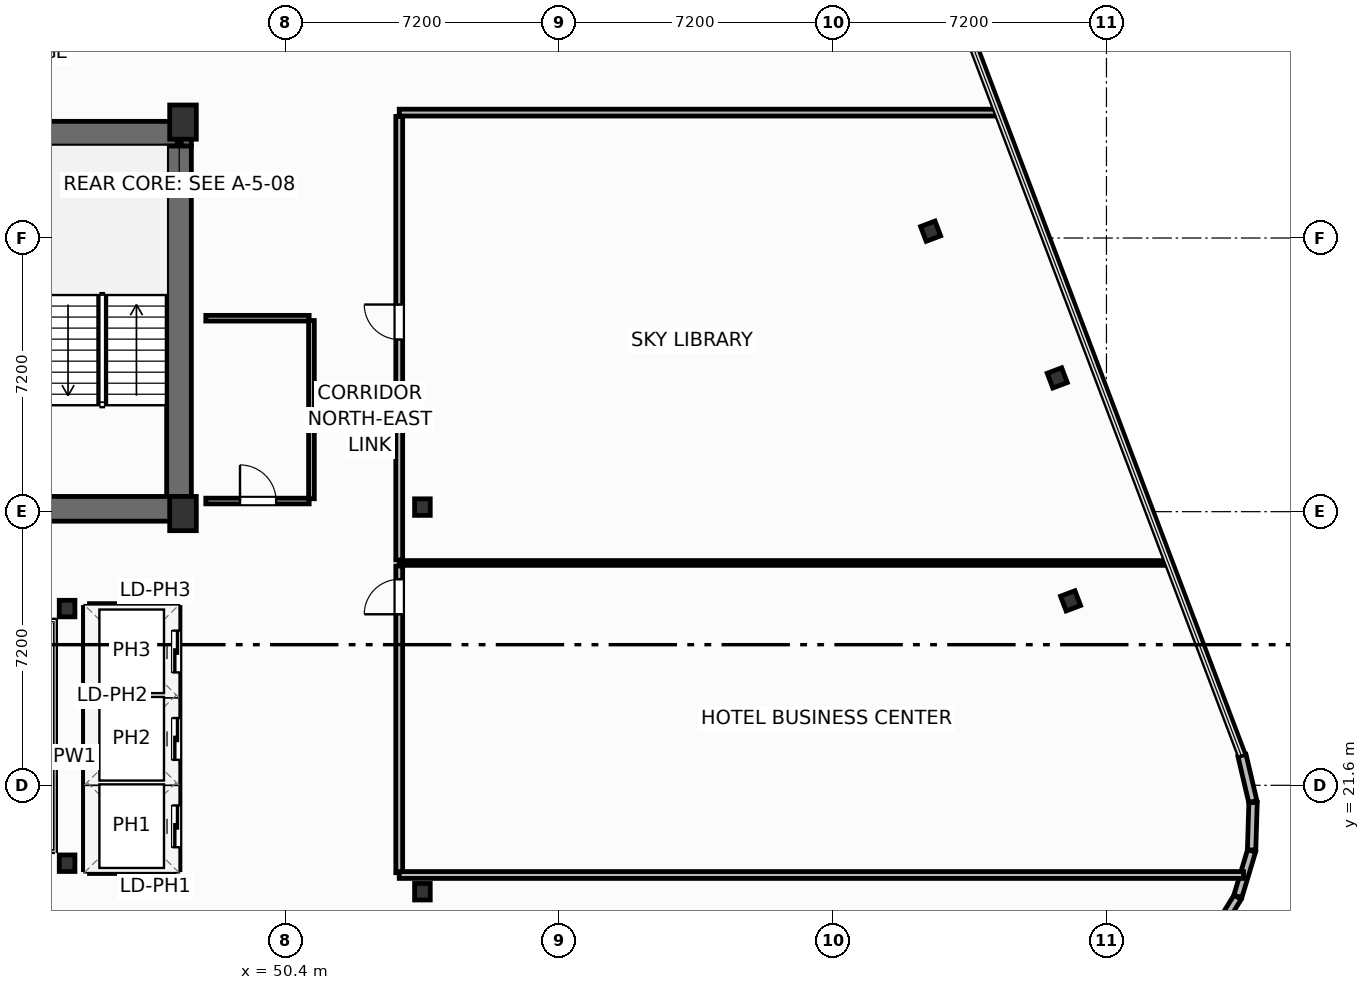
"""IFC4 building model, lengths in metres.
Left out: names, types, materials, properties, quantities, classifications, styles, units other than length and angle.
Written with IfcOpenShell. Run it as: python <this file> out.ifc"""

import sys

from ifc_helpers import new_model, si_unit, direction, frame, frame_2d, origin, origin_2d, place, context, subcontext, project, spatial, rectangle, i_section, extrude, element, fill, save


model = new_model("IFC4")
c1 = context("Model", 3, precision=1e-05, world=origin(), true_north=direction((0.0, 1.0)))
c2 = subcontext(c1, "Body", "Model", "MODEL_VIEW")
j1 = project(units=[si_unit("LENGTHUNIT", "METRE"), si_unit("PLANEANGLEUNIT", "RADIAN")], contexts=[c1])
p1 = place(None, origin())
s1 = spatial("IfcSite", under=j1, at=p1, CompositionType="ELEMENT")
p2 = place(p1, origin())
s2 = spatial("IfcBuilding", under=s1, at=p2, CompositionType="ELEMENT")
p3 = place(p2, frame((0.0, 0.0, 246.0)))
s3 = spatial("IfcBuildingStorey", under=s2, at=p3, CompositionType="ELEMENT", Elevation=246.0)
for number, where, z_axis, x_axis in (
    (1, (47.7, 28.75, 0.0), (0.0, 0.0, 1.0), (1.0, 0.0, 0.0)),
    (2, (47.7, 39.05, 0.0), (0.0, 0.0, 1.0), (1.0, 0.0, 0.0)),
):
    element("IfcColumn", number, at=place(p3, frame(where, z_axis=z_axis, x_axis=x_axis)), inside=s3, PredefinedType="COLUMN", context=c2, shape_type="SweptSolid", body=[
        extrude(rectangle(XDim=0.7, YDim=0.9, at=origin_2d()), origin(), (0.0, 0.0, 1.0), 3.7),
    ])
for number, where, z_axis, x_axis in (
    (3, (44.65, 19.55, 0.0), (0.0, 0.0, 1.0), (1.0, 0.0, 0.0)),
    (4, (44.65, 26.25, 0.0), (0.0, 0.0, 1.0), (1.0, 0.0, 0.0)),
    (5, (54.0, 18.8, 0.0), (0.0, 0.0, 1.0), (1.0, 0.0, 0.0)),
    (6, (54.0, 28.92, 0.0), (0.0, 0.0, 1.0), (1.0, 0.0, 0.0)),
):
    element("IfcColumn", number, at=place(p3, frame(where, z_axis=z_axis, x_axis=x_axis)), inside=s3, PredefinedType="COLUMN", context=c2, shape_type="SweptSolid", body=[
        extrude(i_section(OverallWidth=0.412, OverallDepth=0.435, WebThickness=0.036, FlangeThickness=0.057, FilletRadius=0.025, at=origin_2d()), origin(), (0.0, 0.0, 1.0), 3.7),
    ])
p4 = place(p3, frame((30.48, 38.745, 0.0), z_axis=(0.0, 0.0, 1.0), x_axis=(1.0, 0.0, 0.0)))
e7 = element("IfcWall", 7, at=p4, inside=s3, PredefinedType="SHEAR", context=c2, shape_type="SweptSolid", body=[
    extrude(rectangle(XDim=17.44, YDim=0.65, at=frame_2d((8.72, 0.0))), origin(), (0.0, 0.0, 1.0), 3.45),
])
p5 = place(p3, frame((47.595, 29.2, 0.0), z_axis=(0.0, 0.0, 1.0), x_axis=(0.0, 1.0, 0.0)))
e8 = element("IfcWall", 8, at=p5, inside=s3, PredefinedType="SHEAR", context=c2, shape_type="SweptSolid", body=[
    extrude(rectangle(XDim=9.22, YDim=0.65, at=frame_2d((4.61, 0.0))), origin(), (0.0, 0.0, 1.0), 3.45),
])
p6 = place(p3, frame((43.6, 28.875, 0.0), z_axis=(0.0, 0.0, 1.0), x_axis=(1.0, 0.0, 0.0)))
e9 = element("IfcWall", 9, at=p6, inside=s3, PredefinedType="SHEAR", context=c2, shape_type="SweptSolid", body=[
    extrude(rectangle(XDim=4.32, YDim=0.65, at=frame_2d((2.16, 0.0))), origin(), (0.0, 0.0, 1.0), 3.45),
])
for number, where, z_axis, x_axis in (
    (10, (71.055, 26.453, 0.0), (0.0, 0.0, 1.0), (0.935, 0.354, 0.0)),
    (11, (70.706, 32.32, 0.0), (0.0, 0.0, 1.0), (0.935, 0.354, 0.0)),
    (12, (67.373, 36.18, 0.0), (0.0, 0.0, 1.0), (0.935, 0.354, 0.0)),
):
    element("IfcColumn", number, at=place(p3, frame(where, z_axis=z_axis, x_axis=x_axis)), inside=s3, PredefinedType="COLUMN", context=c2, shape_type="SweptSolid", body=[
        extrude(i_section(OverallWidth=0.406, OverallDepth=0.416, WebThickness=0.03, FlangeThickness=0.048, FilletRadius=0.025, at=origin_2d()), origin(), (0.0, 0.0, 1.0), 3.7),
    ])
for number, where, z_axis, x_axis in (
    (13, (74.794, 17.593, 0.0), (0.0, 0.0, 1.0), (0.527, 0.85, 0.0)),
    (14, (75.458, 18.679, 0.0), (0.0, 0.0, 1.0), (0.288, 0.958, 0.0)),
):
    element("IfcWall", number, at=place(p3, frame(where, z_axis=z_axis, x_axis=x_axis)), inside=s3, PredefinedType="SOLIDWALL", context=c2, shape_type="SweptSolid", body=[
        extrude(rectangle(XDim=1.249, YDim=0.22, at=frame_2d((0.624, 0.0))), origin(), (0.0, 0.0, 1.0), 2.73),
    ])
p7 = place(p3, frame((75.819, 19.899, 0.0), z_axis=(0.0, 0.0, 1.0), x_axis=(0.030898954628, 0.999522513305, 0.0)))
e15 = element("IfcWall", 15, at=p7, inside=s3, PredefinedType="SOLIDWALL", context=c2, shape_type="SweptSolid", body=[
    extrude(rectangle(XDim=1.248, YDim=0.22, at=frame_2d((0.624, 0.0))), origin(), (0.0, 0.0, 1.0), 2.73),
])
p8 = place(p3, frame((75.852, 21.172, 0.0), z_axis=(0.0, 0.0, 1.0), x_axis=(-0.228941257463, 0.973440239887, 0.0)))
e16 = element("IfcWall", 16, at=p8, inside=s3, PredefinedType="SOLIDWALL", context=c2, shape_type="SweptSolid", body=[
    extrude(rectangle(XDim=1.249, YDim=0.22, at=frame_2d((0.625, 0.0))), origin(), (0.0, 0.0, 1.0), 2.73),
])
p9 = place(p3, frame((53.39, 19.3, 0.0), z_axis=(0.0, 0.0, 1.0), x_axis=(0.0, 1.0, 0.0)))
e17 = element("IfcWall", 17, at=p9, inside=s3, PredefinedType="PARTITIONING", context=c2, shape_type="SweptSolid", body=[
    extrude(rectangle(XDim=8.07, YDim=0.18, at=frame_2d((4.035, 0.0))), origin(), (0.0, 0.0, 1.0), 3.45),
])
p10 = place(p9, frame((6.8, 0.0, 0.0)))
e18 = element("IfcOpeningElement", 18, at=p10, cuts=e17, PredefinedType="OPENING", context=c2, shape_type="SweptSolid", body=[
    extrude(rectangle(XDim=0.92, YDim=2.05, at=frame_2d((0.46, 1.025))), frame((0.0, 0.1, 0.0), z_axis=(0.0, -1.0, 0.0), x_axis=(1.0, 0.0, 0.0)), (0.0, 0.0, 1.0), 0.2),
])
p11 = place(p3, frame((53.39, 27.53, 0.0), z_axis=(0.0, 0.0, 1.0), x_axis=(0.0, 1.0, 0.0)))
e19 = element("IfcWall", 19, at=p11, inside=s3, PredefinedType="PARTITIONING", context=c2, shape_type="SweptSolid", body=[
    extrude(rectangle(XDim=11.67, YDim=0.18, at=frame_2d((5.835, 0.0))), origin(), (0.0, 0.0, 1.0), 3.45),
])
p12 = place(p11, frame((5.8, 0.0, 0.0)))
e20 = element("IfcOpeningElement", 20, at=p12, cuts=e19, PredefinedType="OPENING", context=c2, shape_type="SweptSolid", body=[
    extrude(rectangle(XDim=0.92, YDim=2.05, at=frame_2d((0.46, 1.025))), frame((0.0, 0.1, 0.0), z_axis=(0.0, -1.0, 0.0), x_axis=(1.0, 0.0, 0.0)), (0.0, 0.0, 1.0), 0.2),
])
p13 = place(p3, frame((53.39, 27.45, 0.0), z_axis=(0.0, 0.0, 1.0), x_axis=(1.0, 0.0, 0.0)))
e21 = element("IfcWall", 21, at=p13, inside=s3, PredefinedType="PARTITIONING", context=c2, shape_type="SweptSolid", body=[
    extrude(rectangle(XDim=20.199, YDim=0.125, at=frame_2d((10.1, 0.0))), origin(), (0.0, 0.0, 1.0), 2.739),
])
p14 = place(p3, frame((53.39, 19.24, 0.0), z_axis=(0.0, 0.0, 1.0), x_axis=(1.0, 0.0, 0.0)))
e22 = element("IfcWall", 22, at=p14, inside=s3, PredefinedType="PARTITIONING", context=c2, shape_type="SweptSolid", body=[
    extrude(rectangle(XDim=22.217, YDim=0.18, at=frame_2d((11.108, 0.0))), origin(), (0.0, 0.0, 1.0), 3.45),
])
p15 = place(p3, frame((53.39, 39.3, 0.0), z_axis=(0.0, 0.0, 1.0), x_axis=(1.0, 0.0, 0.0)))
e23 = element("IfcWall", 23, at=p15, inside=s3, PredefinedType="PARTITIONING", context=c2, shape_type="SweptSolid", body=[
    extrude(rectangle(XDim=15.713, YDim=0.18, at=frame_2d((7.856, 0.0))), origin(), (0.0, 0.0, 1.0), 3.45),
])
p16 = place(p3, frame((48.3, 29.08, 0.0), z_axis=(0.0, 0.0, 1.0), x_axis=(1.0, 0.0, 0.0)))
e24 = element("IfcWall", 24, at=p16, inside=s3, PredefinedType="PARTITIONING", context=c2, shape_type="SweptSolid", body=[
    extrude(rectangle(XDim=2.72, YDim=0.15, at=frame_2d((1.36, 0.0))), origin(), (0.0, 0.0, 1.0), 2.662),
])
p17 = place(p16, frame((0.9, 0.0, 0.0)))
e25 = element("IfcOpeningElement", 25, at=p17, cuts=e24, PredefinedType="OPENING", context=c2, shape_type="SweptSolid", body=[
    extrude(rectangle(XDim=0.95, YDim=2.05, at=frame_2d((0.475, 1.025))), frame((0.0, 0.085, 0.0), z_axis=(0.0, -1.0, 0.0), x_axis=(1.0, 0.0, 0.0)), (0.0, 0.0, 1.0), 0.17),
])
p18 = place(p3, frame((48.3, 33.89, 0.0), z_axis=(0.0, 0.0, 1.0), x_axis=(1.0, 0.0, 0.0)))
e26 = element("IfcWall", 26, at=p18, inside=s3, PredefinedType="PARTITIONING", context=c2, shape_type="SweptSolid", body=[
    extrude(rectangle(XDim=2.72, YDim=0.15, at=frame_2d((1.36, 0.0))), origin(), (0.0, 0.0, 1.0), 3.45),
])
p19 = place(p3, frame((51.08, 29.14, 0.0), z_axis=(0.0, 0.0, 1.0), x_axis=(0.0, 1.0, 0.0)))
e27 = element("IfcWall", 27, at=p19, inside=s3, PredefinedType="PARTITIONING", context=c2, shape_type="SweptSolid", body=[
    extrude(rectangle(XDim=4.69, YDim=0.15, at=frame_2d((2.345, 0.0))), origin(), (0.0, 0.0, 1.0), 3.45),
])
for number, where, z_axis, x_axis in (
    (28, (45.24, 21.675, 0.0), (0.0, 0.0, 1.0), (1.0, 0.0, 0.0)),
    (29, (45.24, 23.975, 0.0), (0.0, 0.0, 1.0), (1.0, 0.0, 0.0)),
):
    element("IfcWall", number, at=place(p3, frame(where, z_axis=z_axis, x_axis=x_axis)), inside=s3, PredefinedType="PARTITIONING", context=c2, shape_type="SweptSolid", body=[
        extrude(rectangle(XDim=2.22, YDim=0.2, at=frame_2d((1.11, 0.0))), origin(), (0.0, 0.0, 1.0), 3.45),
    ])
p20 = place(p3, frame((45.24, 19.38, 0.0), z_axis=(0.0, 0.0, 1.0), x_axis=(1.0, 0.0, 0.0)))
e30 = element("IfcWall", 30, at=p20, inside=s3, PredefinedType="PARTITIONING", context=c2, shape_type="SweptSolid", body=[
    extrude(rectangle(XDim=2.22, YDim=0.2, at=frame_2d((1.11, 0.0))), origin(), (0.0, 0.0, 1.0), 2.662),
])
p21 = place(p3, frame((45.24, 26.28, 0.0), z_axis=(0.0, 0.0, 1.0), x_axis=(1.0, 0.0, 0.0)))
e31 = element("IfcWall", 31, at=p21, inside=s3, PredefinedType="PARTITIONING", context=c2, shape_type="SweptSolid", body=[
    extrude(rectangle(XDim=2.22, YDim=0.2, at=frame_2d((1.11, 0.0))), origin(), (0.0, 0.0, 1.0), 3.45),
])
p22 = place(p3, frame((45.18, 19.38, 0.0), z_axis=(0.0, 0.0, 1.0), x_axis=(0.0, 1.0, 0.0)))
e32 = element("IfcWall", 32, at=p22, inside=s3, PredefinedType="PARTITIONING", context=c2, shape_type="SweptSolid", body=[
    extrude(rectangle(XDim=6.9, YDim=0.2, at=frame_2d((3.45, 0.0))), origin(), (0.0, 0.0, 1.0), 3.45),
])
p23 = place(p3, frame((47.52, 19.38, 0.0), z_axis=(0.0, 0.0, 1.0), x_axis=(0.0, 1.0, 0.0)))
e33 = element("IfcWall", 33, at=p23, inside=s3, PredefinedType="PARTITIONING", context=c2, shape_type="SweptSolid", body=[
    extrude(rectangle(XDim=6.9, YDim=0.2, at=frame_2d((3.45, 0.0))), origin(), (0.0, 0.0, 1.0), 3.45),
])
p24 = place(p23, frame((0.59, 0.0, 0.0)))
e34 = element("IfcOpeningElement", 34, at=p24, cuts=e33, PredefinedType="OPENING", context=c2, shape_type="SweptSolid", body=[
    extrude(rectangle(XDim=1.1, YDim=2.15, at=frame_2d((0.55, 1.075))), frame((0.0, 0.11, 0.0), z_axis=(0.0, -1.0, 0.0), x_axis=(1.0, 0.0, 0.0)), (0.0, 0.0, 1.0), 0.22),
])
p25 = place(p23, frame((2.89, 0.0, 0.0)))
e35 = element("IfcOpeningElement", 35, at=p25, cuts=e33, PredefinedType="OPENING", context=c2, shape_type="SweptSolid", body=[
    extrude(rectangle(XDim=1.1, YDim=2.15, at=frame_2d((0.55, 1.075))), frame((0.0, 0.11, 0.0), z_axis=(0.0, -1.0, 0.0), x_axis=(1.0, 0.0, 0.0)), (0.0, 0.0, 1.0), 0.22),
])
p26 = place(p23, frame((5.19, 0.0, 0.0)))
e36 = element("IfcOpeningElement", 36, at=p26, cuts=e33, PredefinedType="OPENING", context=c2, shape_type="SweptSolid", body=[
    extrude(rectangle(XDim=1.1, YDim=2.15, at=frame_2d((0.55, 1.075))), frame((0.0, 0.11, 0.0), z_axis=(0.0, -1.0, 0.0), x_axis=(1.0, 0.0, 0.0)), (0.0, 0.0, 1.0), 0.22),
])
p27 = place(p10, origin())
e37 = element("IfcDoor", 37, at=p27, inside=s3, OperationType="SINGLE_SWING_LEFT", PredefinedType="DOOR", context=c2, shape_type="SweptSolid", body=[
    extrude(rectangle(XDim=0.92, YDim=2.05, at=frame_2d((0.46, 1.025))), frame((0.0, 0.025, 0.0), z_axis=(0.0, -1.0, 0.0), x_axis=(1.0, 0.0, 0.0)), (0.0, 0.0, 1.0), 0.05),
])
fill(e18, e37)
p28 = place(p12, origin())
e38 = element("IfcDoor", 38, at=p28, inside=s3, OperationType="SINGLE_SWING_RIGHT", PredefinedType="DOOR", context=c2, shape_type="SweptSolid", body=[
    extrude(rectangle(XDim=0.92, YDim=2.05, at=frame_2d((0.46, 1.025))), frame((0.0, 0.025, 0.0), z_axis=(0.0, -1.0, 0.0), x_axis=(1.0, 0.0, 0.0)), (0.0, 0.0, 1.0), 0.05),
])
fill(e20, e38)
p29 = place(p17, origin())
e39 = element("IfcDoor", 39, at=p29, inside=s3, OperationType="SINGLE_SWING_LEFT", PredefinedType="DOOR", context=c2, shape_type="SweptSolid", body=[
    extrude(rectangle(XDim=0.95, YDim=2.05, at=frame_2d((0.475, 1.025))), frame((0.0, 0.025, 0.0), z_axis=(0.0, -1.0, 0.0), x_axis=(1.0, 0.0, 0.0)), (0.0, 0.0, 1.0), 0.05),
])
fill(e25, e39)
p30 = place(p24, origin())
e40 = element("IfcDoor", 40, at=p30, inside=s3, OperationType="SLIDING_TO_LEFT", PredefinedType="DOOR", context=c2, shape_type="SweptSolid", body=[
    extrude(rectangle(XDim=1.1, YDim=2.15, at=frame_2d((0.55, 1.075))), frame((0.0, 0.025, 0.0), z_axis=(0.0, -1.0, 0.0), x_axis=(1.0, 0.0, 0.0)), (0.0, 0.0, 1.0), 0.05),
])
fill(e34, e40)
p31 = place(p25, origin())
e41 = element("IfcDoor", 41, at=p31, inside=s3, OperationType="SLIDING_TO_LEFT", PredefinedType="DOOR", context=c2, shape_type="SweptSolid", body=[
    extrude(rectangle(XDim=1.1, YDim=2.15, at=frame_2d((0.55, 1.075))), frame((0.0, 0.025, 0.0), z_axis=(0.0, -1.0, 0.0), x_axis=(1.0, 0.0, 0.0)), (0.0, 0.0, 1.0), 0.05),
])
fill(e35, e41)
p32 = place(p26, origin())
e42 = element("IfcDoor", 42, at=p32, inside=s3, OperationType="SLIDING_TO_LEFT", PredefinedType="DOOR", context=c2, shape_type="SweptSolid", body=[
    extrude(rectangle(XDim=1.1, YDim=2.15, at=frame_2d((0.55, 1.075))), frame((0.0, 0.025, 0.0), z_axis=(0.0, -1.0, 0.0), x_axis=(1.0, 0.0, 0.0)), (0.0, 0.0, 1.0), 0.05),
])
fill(e36, e42)
save(model, sys.argv[1])
